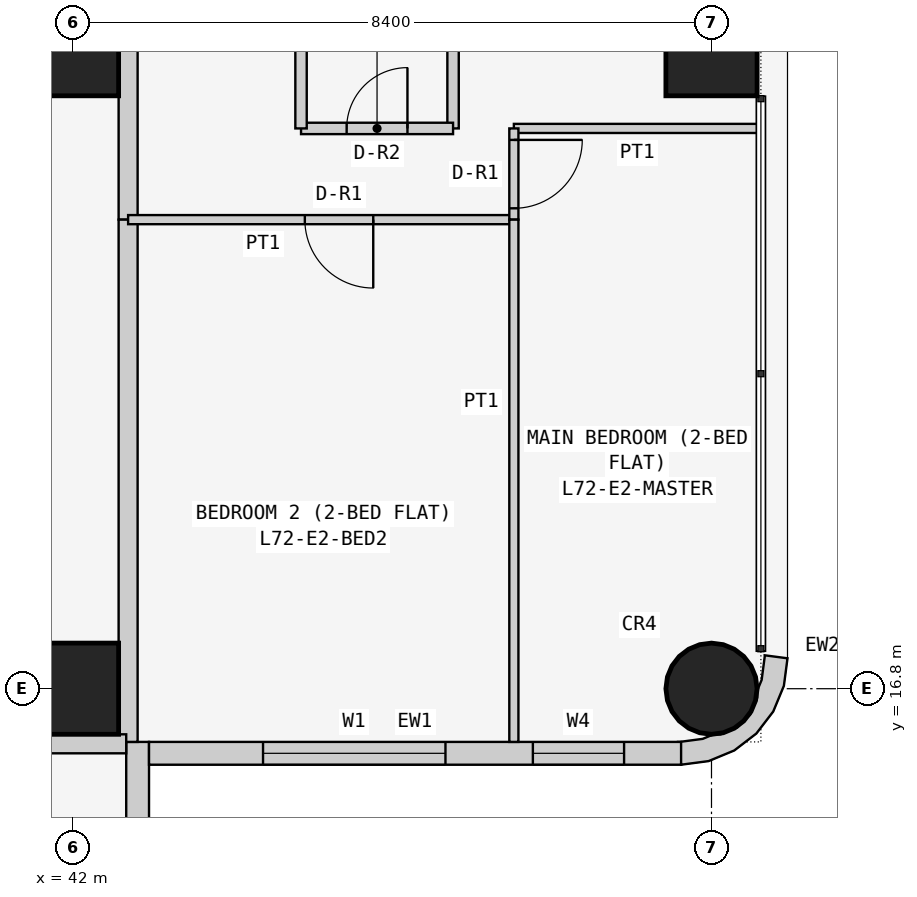
"""IFC4 building model, lengths in metres.
Left out: names, types, materials, properties, quantities, classifications, styles, units other than length and angle.
Written with IfcOpenShell. Run it as: python <this file> out.ifc"""

import sys

from ifc_helpers import new_model, si_unit, direction, frame, frame_2d, origin, origin_2d, place, context, subcontext, project, spatial, polyline, rectangle, circle, outline, extrude, element, fill, save


model = new_model("IFC4")
c1 = context("Model", 3, precision=1e-05, world=origin(), true_north=direction((0.0, 1.0)))
c2 = subcontext(c1, "Body", "Model", "MODEL_VIEW")
j1 = project(units=[si_unit("LENGTHUNIT", "METRE"), si_unit("PLANEANGLEUNIT", "RADIAN")], contexts=[c1])
p1 = place(None, origin())
s1 = spatial("IfcSite", under=j1, at=p1, CompositionType="ELEMENT")
p2 = place(p1, origin())
s2 = spatial("IfcBuilding", under=s1, at=p2, CompositionType="ELEMENT")
p3 = place(p2, frame((0.0, 0.0, 275.7)))
s3 = spatial("IfcBuildingStorey", under=s2, at=p3, CompositionType="ELEMENT", Elevation=275.7)
for number, where, z_axis, x_axis in (
    (1, (42.0, 16.8, 0.0), (0.0, 0.0, 1.0), (1.0, 0.0, 0.0)),
    (2, (42.0, 25.2, 0.0), (0.0, 0.0, 1.0), (1.0, 0.0, 0.0)),
):
    element("IfcColumn", number, at=place(p3, frame(where, z_axis=z_axis, x_axis=x_axis)), inside=s3, PredefinedType="COLUMN", context=c2, shape_type="SweptSolid", body=[
        extrude(rectangle(XDim=1.2, YDim=1.2, at=origin_2d()), origin(), (0.0, 0.0, 1.0), 3.6),
    ])
p4 = place(p3, frame((50.4, 16.8, 0.0), z_axis=(0.0, 0.0, 1.0), x_axis=(1.0, 0.0, 0.0)))
e3 = element("IfcColumn", 3, at=p4, inside=s3, PredefinedType="COLUMN", context=c2, shape_type="SweptSolid", body=[
    extrude(circle(Radius=0.6, at=origin_2d()), origin(), (0.0, 0.0, 1.0), 3.6),
])
p5 = place(p3, frame((50.4, 25.2, 0.0), z_axis=(0.0, 0.0, 1.0), x_axis=(1.0, 0.0, 0.0)))
e4 = element("IfcColumn", 4, at=p5, inside=s3, PredefinedType="COLUMN", context=c2, shape_type="SweptSolid", body=[
    extrude(rectangle(XDim=1.2, YDim=1.2, at=origin_2d()), origin(), (0.0, 0.0, 1.0), 3.6),
])
p6 = place(p3, frame((42.85, 8.8, 0.0), z_axis=(0.0, 0.0, 1.0), x_axis=(0.0, 1.0, 0.0)))
e5 = element("IfcWall", 5, at=p6, inside=s3, PredefinedType="SOLIDWALL", context=c2, shape_type="SweptSolid", body=[
    extrude(rectangle(XDim=7.3, YDim=0.3, at=frame_2d((3.65, 0.0))), origin(), (0.0, 0.0, 1.0), 3.45),
])
p7 = place(p6, frame((3.1, 0.0, 0.9)))
e6 = element("IfcOpeningElement", 6, at=p7, cuts=e5, PredefinedType="OPENING", context=c2, shape_type="SweptSolid", body=[
    extrude(rectangle(XDim=2.4, YDim=1.5, at=frame_2d((1.2, 0.75))), frame((0.0, 0.16, 0.0), z_axis=(0.0, -1.0, 0.0), x_axis=(1.0, 0.0, 0.0)), (0.0, 0.0, 1.0), 0.32),
])
p8 = place(p6, frame((0.75, 0.0, 0.9)))
e7 = element("IfcOpeningElement", 7, at=p8, cuts=e5, PredefinedType="OPENING", context=c2, shape_type="SweptSolid", body=[
    extrude(rectangle(XDim=1.2, YDim=1.5, at=frame_2d((0.6, 0.75))), frame((0.0, 0.16, 0.0), z_axis=(0.0, -1.0, 0.0), x_axis=(1.0, 0.0, 0.0)), (0.0, 0.0, 1.0), 0.32),
])
p9 = place(p3, frame((43.0, 15.95, 0.0), z_axis=(0.0, 0.0, 1.0), x_axis=(1.0, 0.0, 0.0)))
e8 = element("IfcWall", 8, at=p9, inside=s3, PredefinedType="SOLIDWALL", context=c2, shape_type="SweptSolid", body=[
    extrude(rectangle(XDim=7.0, YDim=0.3, at=frame_2d((3.5, 0.0))), origin(), (0.0, 0.0, 1.0), 3.45),
])
p10 = place(p9, frame((1.5, 0.0, 0.9)))
e9 = element("IfcOpeningElement", 9, at=p10, cuts=e8, PredefinedType="OPENING", context=c2, shape_type="SweptSolid", body=[
    extrude(rectangle(XDim=2.4, YDim=1.5, at=frame_2d((1.2, 0.75))), frame((0.0, 0.16, 0.0), z_axis=(0.0, -1.0, 0.0), x_axis=(1.0, 0.0, 0.0)), (0.0, 0.0, 1.0), 0.32),
])
p11 = place(p9, frame((5.05, 0.0, 0.9)))
e10 = element("IfcOpeningElement", 10, at=p11, cuts=e8, PredefinedType="OPENING", context=c2, shape_type="SweptSolid", body=[
    extrude(rectangle(XDim=1.2, YDim=1.5, at=frame_2d((0.6, 0.75))), frame((0.0, 0.16, 0.0), z_axis=(0.0, -1.0, 0.0), x_axis=(1.0, 0.0, 0.0)), (0.0, 0.0, 1.0), 0.32),
])
p12 = place(p3, frame((50.038, 16.224, 0.0), z_axis=(0.0, 0.0, 1.0), x_axis=(0.707106781187, -0.707106781187, 0.0)))
e11 = element("IfcWall", 11, at=p12, inside=s3, PredefinedType="SOLIDWALL", context=c2, shape_type="SweptSolid", body=[
    extrude(outline(polyline([(0.047, 1.455), (0.233, 1.212), (0.292, 1.069), (0.358, 1.003), (0.449, 0.782), (0.449, 0.543), (0.358, 0.322), (0.292, 0.257), (0.233, 0.114), (0.047, -0.129), (0.033, -0.143), (0.273, -0.327), (0.495, -0.037), (0.635, 0.301), (0.683, 0.663), (0.635, 1.025), (0.495, 1.363), (0.273, 1.653), (0.033, 1.469), (0.047, 1.455)])), origin(), (0.0, 0.0, 1.0), 3.45),
])
p13 = place(p3, frame((42.725, 29.4, 0.0), z_axis=(0.0, 0.0, 1.0), x_axis=(0.0, -1.0, 0.0)))
e12 = element("IfcWall", 12, at=p13, inside=s3, PredefinedType="PARTITIONING", context=c2, shape_type="SweptSolid", body=[
    extrude(rectangle(XDim=6.429, YDim=0.25, at=frame_2d((3.214, 0.0))), origin(), (0.0, 0.0, 1.0), 3.45),
])
p14 = place(p13, frame((0.5, 0.0, 0.0)))
e13 = element("IfcOpeningElement", 13, at=p14, cuts=e12, PredefinedType="OPENING", context=c2, shape_type="SweptSolid", body=[
    extrude(rectangle(XDim=1.0, YDim=2.1, at=frame_2d((0.5, 1.05))), frame((0.0, 0.135, 0.0), z_axis=(0.0, -1.0, 0.0), x_axis=(1.0, 0.0, 0.0)), (0.0, 0.0, 1.0), 0.27),
])
p15 = place(p3, frame((42.725, 22.971, 0.0), z_axis=(0.0, 0.0, 1.0), x_axis=(0.0, -1.0, 0.0)))
e14 = element("IfcWall", 14, at=p15, inside=s3, PredefinedType="PARTITIONING", context=c2, shape_type="SweptSolid", body=[
    extrude(rectangle(XDim=6.871, YDim=0.25, at=frame_2d((3.436, 0.0))), origin(), (0.0, 0.0, 1.0), 3.45),
])
p16 = place(p3, frame((42.7, 16.075, 0.0), z_axis=(0.0, 0.0, 1.0), x_axis=(-1.0, 0.0, 0.0)))
e15 = element("IfcWall", 15, at=p16, inside=s3, PredefinedType="PARTITIONING", context=c2, shape_type="SweptSolid", body=[
    extrude(rectangle(XDim=6.471, YDim=0.25, at=frame_2d((3.235, 0.0))), origin(), (0.0, 0.0, 1.0), 3.45),
])
p17 = place(p3, frame((47.0, 29.4, 0.0), z_axis=(0.0, 0.0, 1.0), x_axis=(0.0, -1.0, 0.0)))
e16 = element("IfcWall", 16, at=p17, inside=s3, PredefinedType="PARTITIONING", context=c2, shape_type="SweptSolid", body=[
    extrude(rectangle(XDim=5.229, YDim=0.15, at=frame_2d((2.615, 0.0))), origin(), (0.0, 0.0, 1.0), 3.45),
])
p18 = place(p3, frame((47.0, 24.171, 0.0), z_axis=(0.0, 0.0, 1.0), x_axis=(-1.0, 0.0, 0.0)))
e17 = element("IfcWall", 17, at=p18, inside=s3, PredefinedType="PARTITIONING", context=c2, shape_type="SweptSolid", body=[
    extrude(rectangle(XDim=2.0, YDim=0.15, at=frame_2d((1.0, 0.0))), origin(), (0.0, 0.0, 1.0), 3.45),
])
p19 = place(p18, frame((0.6, 0.0, 0.0)))
e18 = element("IfcOpeningElement", 18, at=p19, cuts=e17, PredefinedType="OPENING", context=c2, shape_type="SweptSolid", body=[
    extrude(rectangle(XDim=0.8, YDim=2.1, at=frame_2d((0.4, 1.05))), frame((0.0, 0.085, 0.0), z_axis=(0.0, -1.0, 0.0), x_axis=(1.0, 0.0, 0.0)), (0.0, 0.0, 1.0), 0.17),
])
p20 = place(p3, frame((45.0, 24.171, 0.0), z_axis=(0.0, 0.0, 1.0), x_axis=(0.0, 1.0, 0.0)))
e19 = element("IfcWall", 19, at=p20, inside=s3, PredefinedType="PARTITIONING", context=c2, shape_type="SweptSolid", body=[
    extrude(rectangle(XDim=5.229, YDim=0.15, at=frame_2d((2.615, 0.0))), origin(), (0.0, 0.0, 1.0), 3.45),
])
p21 = place(p3, frame((47.8, 22.971, 0.0), z_axis=(0.0, 0.0, 1.0), x_axis=(-1.0, 0.0, 0.0)))
e20 = element("IfcWall", 20, at=p21, inside=s3, PredefinedType="PARTITIONING", context=c2, shape_type="SweptSolid", body=[
    extrude(rectangle(XDim=5.075, YDim=0.12, at=frame_2d((2.538, 0.0))), origin(), (0.0, 0.0, 1.0), 3.45),
])
p22 = place(p21, frame((1.85, 0.0, 0.0)))
e21 = element("IfcOpeningElement", 21, at=p22, cuts=e20, PredefinedType="OPENING", context=c2, shape_type="SweptSolid", body=[
    extrude(rectangle(XDim=0.9, YDim=2.1, at=frame_2d((0.45, 1.05))), frame((0.0, 0.07, 0.0), z_axis=(0.0, -1.0, 0.0), x_axis=(1.0, 0.0, 0.0)), (0.0, 0.0, 1.0), 0.14),
])
p23 = place(p3, frame((51.05, 24.171, 0.0), z_axis=(0.0, 0.0, 1.0), x_axis=(-1.0, 0.0, 0.0)))
e22 = element("IfcWall", 22, at=p23, inside=s3, PredefinedType="PARTITIONING", context=c2, shape_type="SweptSolid", body=[
    extrude(rectangle(XDim=3.25, YDim=0.12, at=frame_2d((1.625, 0.0))), origin(), (0.0, 0.0, 1.0), 3.45),
])
p24 = place(p3, frame((47.8, 24.171, 0.0), z_axis=(0.0, 0.0, 1.0), x_axis=(0.0, -1.0, 0.0)))
e23 = element("IfcWall", 23, at=p24, inside=s3, PredefinedType="PARTITIONING", context=c2, shape_type="SweptSolid", body=[
    extrude(rectangle(XDim=1.2, YDim=0.12, at=frame_2d((0.6, 0.0))), origin(), (0.0, 0.0, 1.0), 3.45),
])
p25 = place(p24, frame((0.151, 0.0, 0.0)))
e24 = element("IfcOpeningElement", 24, at=p25, cuts=e23, PredefinedType="OPENING", context=c2, shape_type="SweptSolid", body=[
    extrude(rectangle(XDim=0.9, YDim=2.1, at=frame_2d((0.45, 1.05))), frame((0.0, 0.07, 0.0), z_axis=(0.0, -1.0, 0.0), x_axis=(1.0, 0.0, 0.0)), (0.0, 0.0, 1.0), 0.14),
])
p26 = place(p3, frame((47.8, 22.971, 0.0), z_axis=(0.0, 0.0, 1.0), x_axis=(0.0, -1.0, 0.0)))
e25 = element("IfcWall", 25, at=p26, inside=s3, PredefinedType="PARTITIONING", context=c2, shape_type="SweptSolid", body=[
    extrude(rectangle(XDim=6.871, YDim=0.12, at=frame_2d((3.436, 0.0))), origin(), (0.0, 0.0, 1.0), 3.45),
])
p27 = place(p10, origin())
e26 = element("IfcWindow", 26, at=p27, inside=s3, PartitioningType="SINGLE_PANEL", PredefinedType="WINDOW", context=c2, shape_type="SweptSolid", body=[
    extrude(rectangle(XDim=2.4, YDim=1.5, at=frame_2d((1.2, 0.75))), frame((0.0, 0.03, 0.0), z_axis=(0.0, -1.0, 0.0), x_axis=(1.0, 0.0, 0.0)), (0.0, 0.0, 1.0), 0.06),
])
fill(e9, e26)
p28 = place(p11, origin())
e27 = element("IfcWindow", 27, at=p28, inside=s3, PartitioningType="SINGLE_PANEL", PredefinedType="WINDOW", context=c2, shape_type="SweptSolid", body=[
    extrude(rectangle(XDim=1.2, YDim=1.5, at=frame_2d((0.6, 0.75))), frame((0.0, 0.03, 0.0), z_axis=(0.0, -1.0, 0.0), x_axis=(1.0, 0.0, 0.0)), (0.0, 0.0, 1.0), 0.06),
])
fill(e10, e27)
p29 = place(p19, frame((0.8, 0.0, 0.0), z_axis=(0.0, 0.0, 1.0), x_axis=(-1.0, 0.0, 0.0)))
e28 = element("IfcDoor", 28, at=p29, inside=s3, OperationType="SINGLE_SWING_RIGHT", PredefinedType="DOOR", context=c2, shape_type="SweptSolid", body=[
    extrude(rectangle(XDim=0.8, YDim=2.1, at=frame_2d((0.4, 1.05))), frame((0.0, 0.025, 0.0), z_axis=(0.0, -1.0, 0.0), x_axis=(1.0, 0.0, 0.0)), (0.0, 0.0, 1.0), 0.05),
])
fill(e18, e28)
p30 = place(p22, origin())
e29 = element("IfcDoor", 29, at=p30, inside=s3, OperationType="SINGLE_SWING_LEFT", PredefinedType="DOOR", context=c2, shape_type="SweptSolid", body=[
    extrude(rectangle(XDim=0.9, YDim=2.1, at=frame_2d((0.45, 1.05))), frame((0.0, 0.025, 0.0), z_axis=(0.0, -1.0, 0.0), x_axis=(1.0, 0.0, 0.0)), (0.0, 0.0, 1.0), 0.05),
])
fill(e21, e29)
p31 = place(p25, origin())
e30 = element("IfcDoor", 30, at=p31, inside=s3, OperationType="SINGLE_SWING_LEFT", PredefinedType="DOOR", context=c2, shape_type="SweptSolid", body=[
    extrude(rectangle(XDim=0.9, YDim=2.1, at=frame_2d((0.45, 1.05))), frame((0.0, 0.025, 0.0), z_axis=(0.0, -1.0, 0.0), x_axis=(1.0, 0.0, 0.0)), (0.0, 0.0, 1.0), 0.05),
])
fill(e24, e30)
save(model, sys.argv[1])
